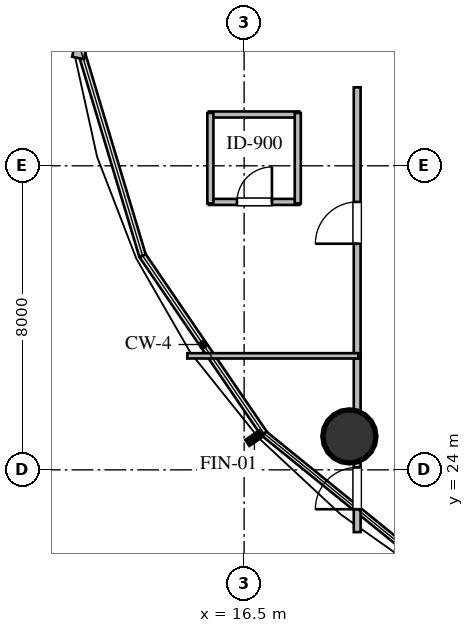
"""IFC4 building model, lengths in metres.
Left out: names, types, materials, properties, quantities, classifications, styles, units other than length and angle.
Written with IfcOpenShell. Run it as: python <this file> out.ifc"""

import sys

from ifc_helpers import new_model, si_unit, direction, frame, frame_2d, origin, origin_2d, place, context, subcontext, project, spatial, rectangle, circle, extrude, element, fill, save


model = new_model("IFC4")
c1 = context("Model", 3, precision=1e-05, world=origin(), true_north=direction((0.0, 1.0)))
c2 = subcontext(c1, "Body", "Model", "MODEL_VIEW")
j1 = project(units=[si_unit("LENGTHUNIT", "METRE"), si_unit("PLANEANGLEUNIT", "RADIAN")], contexts=[c1])
p1 = place(None, origin())
s1 = spatial("IfcSite", under=j1, at=p1, CompositionType="ELEMENT")
p2 = place(p1, origin())
s2 = spatial("IfcBuilding", under=s1, at=p2, CompositionType="ELEMENT")
p3 = place(p2, frame((0.0, 0.0, 85.2)))
s3 = spatial("IfcBuildingStorey", under=s2, at=p3, CompositionType="ELEMENT", Elevation=85.2)
p4 = place(p3, frame((19.27, 24.88, 0.0), z_axis=(0.0, 0.0, 1.0), x_axis=(1.0, 0.0, 0.0)))
e1 = element("IfcColumn", 1, at=p4, inside=s3, PredefinedType="COLUMN", context=c2, shape_type="SweptSolid", body=[
    extrude(circle(Radius=0.7, at=origin_2d()), origin(), (0.0, 0.0, 1.0), 3.6),
])
p5 = place(p3, frame((12.132, 34.837, 0.0), z_axis=(0.0, 0.0, 1.0), x_axis=(0.210310821848, 0.977634572943, 0.0)))
e2 = element("IfcWall", 2, at=p5, inside=s3, PredefinedType="STANDARD", context=c2, shape_type="SweptSolid", body=[
    extrude(rectangle(XDim=15.163, YDim=0.32, at=frame_2d((7.582, 0.0))), origin(), (0.0, 0.0, 1.0), 2.738),
])
p6 = place(p3, frame((15.572, 31.05, 0.0), z_axis=(0.0, 0.0, 1.0), x_axis=(1.0, 0.0, 0.0)))
e3 = element("IfcWall", 3, at=p6, inside=s3, PredefinedType="PLUMBINGWALL", context=c2, shape_type="SweptSolid", body=[
    extrude(rectangle(XDim=2.38, YDim=0.16, at=frame_2d((1.19, 0.0))), origin(), (0.0, 0.0, 1.0), 3.36),
])
p7 = place(p6, frame((0.74, 0.0, 0.0)))
e4 = element("IfcOpeningElement", 4, at=p7, cuts=e3, PredefinedType="OPENING", context=c2, shape_type="SweptSolid", body=[
    extrude(rectangle(XDim=0.92, YDim=2.1, at=frame_2d((0.46, 1.05))), frame((0.0, 0.09, 0.0), z_axis=(0.0, -1.0, 0.0), x_axis=(1.0, 0.0, 0.0)), (0.0, 0.0, 1.0), 0.18),
])
for number, where, z_axis, x_axis in (
    (5, (15.572, 33.35, 0.0), (0.0, 0.0, 1.0), (1.0, 0.0, 0.0)),
    (6, (15.612, 31.01, 0.0), (0.0, 0.0, 1.0), (0.0, 1.0, 0.0)),
):
    element("IfcWall", number, at=place(p3, frame(where, z_axis=z_axis, x_axis=x_axis)), inside=s3, PredefinedType="PLUMBINGWALL", context=c2, shape_type="SweptSolid", body=[
        extrude(rectangle(XDim=2.38, YDim=0.16, at=frame_2d((1.19, 0.0))), origin(), (0.0, 0.0, 1.0), 3.36),
    ])
p8 = place(p3, frame((17.912, 31.01, 0.0), z_axis=(0.0, 0.0, 1.0), x_axis=(0.0, 1.0, 0.0)))
e7 = element("IfcWall", 7, at=p8, inside=s3, PredefinedType="PLUMBINGWALL", context=c2, shape_type="SweptSolid", body=[
    extrude(rectangle(XDim=2.38, YDim=0.16, at=frame_2d((1.19, 0.0))), origin(), (0.0, 0.0, 1.0), 2.738),
])
p9 = place(p3, frame((19.475, 22.362, 0.0), z_axis=(0.0, 0.0, 1.0), x_axis=(0.0, 1.0, 0.0)))
e8 = element("IfcWall", 8, at=p9, inside=s3, PredefinedType="PARTITIONING", context=c2, shape_type="SweptSolid", body=[
    extrude(rectangle(XDim=4.703, YDim=0.18, at=frame_2d((2.352, 0.0))), origin(), (0.0, 0.0, 1.0), 2.738),
])
p10 = place(p9, frame((0.602, 0.0, 0.0)))
e9 = element("IfcOpeningElement", 9, at=p10, cuts=e8, PredefinedType="OPENING", context=c2, shape_type="SweptSolid", body=[
    extrude(rectangle(XDim=1.1, YDim=2.1, at=frame_2d((0.55, 1.05))), frame((0.0, 0.1, 0.0), z_axis=(0.0, -1.0, 0.0), x_axis=(1.0, 0.0, 0.0)), (0.0, 0.0, 1.0), 0.2),
])
p11 = place(p3, frame((19.475, 26.935, 0.0), z_axis=(0.0, 0.0, 1.0), x_axis=(0.0, 1.0, 0.0)))
e10 = element("IfcWall", 10, at=p11, inside=s3, PredefinedType="PARTITIONING", context=c2, shape_type="SweptSolid", body=[
    extrude(rectangle(XDim=7.13, YDim=0.18, at=frame_2d((3.565, 0.0))), origin(), (0.0, 0.0, 1.0), 3.36),
])
p12 = place(p11, frame((3.015, 0.0, 0.0)))
e11 = element("IfcOpeningElement", 11, at=p12, cuts=e10, PredefinedType="OPENING", context=c2, shape_type="SweptSolid", body=[
    extrude(rectangle(XDim=1.1, YDim=2.1, at=frame_2d((0.55, 1.05))), frame((0.0, 0.1, 0.0), z_axis=(0.0, -1.0, 0.0), x_axis=(1.0, 0.0, 0.0)), (0.0, 0.0, 1.0), 0.2),
])
p13 = place(p3, frame((15.006, 27.0, 0.0), z_axis=(0.0, 0.0, 1.0), x_axis=(1.0, 0.0, 0.0)))
e12 = element("IfcWall", 12, at=p13, inside=s3, PredefinedType="PARTITIONING", context=c2, shape_type="SweptSolid", body=[
    extrude(rectangle(XDim=4.499, YDim=0.14, at=frame_2d((2.25, 0.0))), origin(), (0.0, 0.0, 1.0), 3.36),
])
p14 = place(p7, origin())
e13 = element("IfcDoor", 13, at=p14, inside=s3, OperationType="SINGLE_SWING_RIGHT", PredefinedType="DOOR", context=c2, shape_type="SweptSolid", body=[
    extrude(rectangle(XDim=0.92, YDim=2.1, at=frame_2d((0.46, 1.05))), frame((0.0, 0.025, 0.0), z_axis=(0.0, -1.0, 0.0), x_axis=(1.0, 0.0, 0.0)), (0.0, 0.0, 1.0), 0.05),
])
fill(e4, e13)
p15 = place(p10, origin())
e14 = element("IfcDoor", 14, at=p15, inside=s3, OperationType="SINGLE_SWING_LEFT", PredefinedType="DOOR", context=c2, shape_type="SweptSolid", body=[
    extrude(rectangle(XDim=1.1, YDim=2.1, at=frame_2d((0.55, 1.05))), frame((0.0, 0.025, 0.0), z_axis=(0.0, -1.0, 0.0), x_axis=(1.0, 0.0, 0.0)), (0.0, 0.0, 1.0), 0.05),
])
fill(e9, e14)
p16 = place(p12, origin())
e15 = element("IfcDoor", 15, at=p16, inside=s3, OperationType="SINGLE_SWING_LEFT", PredefinedType="DOOR", context=c2, shape_type="SweptSolid", body=[
    extrude(rectangle(XDim=1.1, YDim=2.1, at=frame_2d((0.55, 1.05))), frame((0.0, 0.025, 0.0), z_axis=(0.0, -1.0, 0.0), x_axis=(1.0, 0.0, 0.0)), (0.0, 0.0, 1.0), 0.05),
])
fill(e11, e15)
save(model, sys.argv[1])
